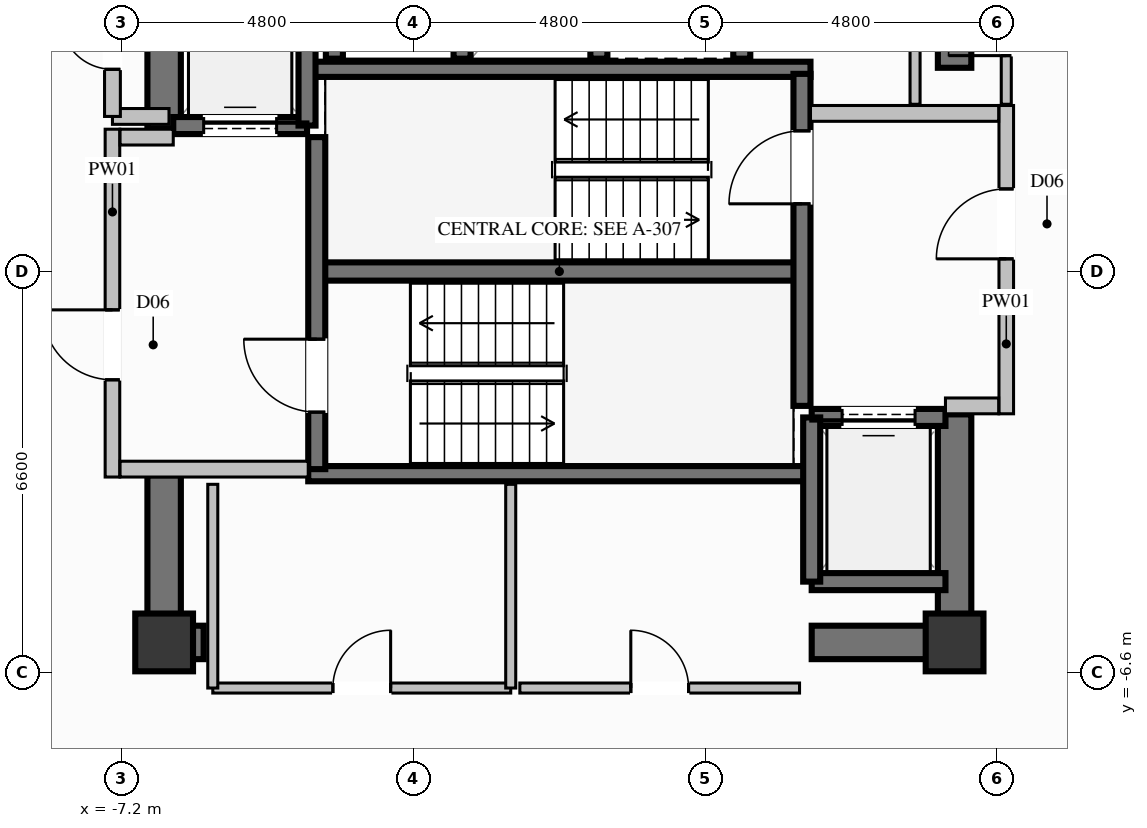
"""IFC4 building model, lengths in metres.
Left out: names, types, materials, properties, quantities, classifications, styles, units other than length and angle.
Written with IfcOpenShell. Run it as: python <this file> out.ifc"""

import sys

from ifc_helpers import new_model, si_unit, direction, frame, frame_2d, origin, origin_2d, place, context, subcontext, project, spatial, rectangle, extrude, element, fill, save


model = new_model("IFC4")
c1 = context("Model", 3, precision=1e-05, world=origin(), true_north=direction((0.0, 1.0)))
c2 = subcontext(c1, "Body", "Model", "MODEL_VIEW")
j1 = project(units=[si_unit("LENGTHUNIT", "METRE"), si_unit("PLANEANGLEUNIT", "RADIAN")], contexts=[c1])
p1 = place(None, origin())
s1 = spatial("IfcSite", under=j1, at=p1, CompositionType="ELEMENT")
p2 = place(p1, origin())
s2 = spatial("IfcBuilding", under=s1, at=p2, CompositionType="ELEMENT")
p3 = place(p2, frame((0.0, 0.0, 194.8)))
s3 = spatial("IfcBuildingStorey", under=s2, at=p3, CompositionType="ELEMENT", Elevation=194.8)
for number, where, z_axis, x_axis in (
    (1, (-6.5, -6.1, 0.0), (0.0, 0.0, 1.0), (1.0, 0.0, 0.0)),
    (2, (6.5, -6.1, 0.0), (0.0, 0.0, 1.0), (1.0, 0.0, 0.0)),
):
    element("IfcColumn", number, at=place(p3, frame(where, z_axis=z_axis, x_axis=x_axis)), inside=s3, PredefinedType="COLUMN", context=c2, shape_type="SweptSolid", body=[
        extrude(rectangle(XDim=0.95, YDim=0.95, at=origin_2d()), origin(), (0.0, 0.0, 1.0), 3.6),
    ])
p4 = place(p3, frame((-3.99, 0.0, 0.0), z_axis=(0.0, 0.0, 1.0), x_axis=(1.0, 0.0, 0.0)))
e3 = element("IfcWall", 3, at=p4, inside=s3, PredefinedType="SHEAR", context=c2, shape_type="SweptSolid", body=[
    extrude(rectangle(XDim=7.98, YDim=0.3, at=frame_2d((3.99, 0.0))), origin(), (0.0, 0.0, 1.0), 3.6),
])
for number, where, z_axis, x_axis in (
    (4, (-4.13, -3.325, 0.0), (0.0, 0.0, 1.0), (1.0, 0.0, 0.0)),
    (5, (-4.13, 3.325, 0.0), (0.0, 0.0, 1.0), (1.0, 0.0, 0.0)),
):
    element("IfcWall", number, at=place(p3, frame(where, z_axis=z_axis, x_axis=x_axis)), inside=s3, PredefinedType="SOLIDWALL", context=c2, shape_type="SweptSolid", body=[
        extrude(rectangle(XDim=8.26, YDim=0.25, at=frame_2d((4.13, 0.0))), origin(), (0.0, 0.0, 1.0), 3.6),
    ])
p5 = place(p3, frame((-6.225, -6.1, 0.0), z_axis=(0.0, 0.0, 1.0), x_axis=(1.0, 0.0, 0.0)))
e6 = element("IfcWall", 6, at=p5, inside=s3, PredefinedType="SHEAR", context=c2, shape_type="SweptSolid", body=[
    extrude(rectangle(XDim=0.375, YDim=0.55, at=frame_2d((0.188, 0.0))), origin(), (0.0, 0.0, 1.0), 3.6),
])
p6 = place(p3, frame((4.15, -6.1, 0.0), z_axis=(0.0, 0.0, 1.0), x_axis=(1.0, 0.0, 0.0)))
e7 = element("IfcWall", 7, at=p6, inside=s3, PredefinedType="SHEAR", context=c2, shape_type="SweptSolid", body=[
    extrude(rectangle(XDim=2.075, YDim=0.55, at=frame_2d((1.038, 0.0))), origin(), (0.0, 0.0, 1.0), 3.6),
])
p7 = place(p3, frame((-6.5, 2.35, 0.0), z_axis=(0.0, 0.0, 1.0), x_axis=(0.0, 1.0, 0.0)))
e8 = element("IfcWall", 8, at=p7, inside=s3, PredefinedType="SHEAR", context=c2, shape_type="SweptSolid", body=[
    extrude(rectangle(XDim=4.025, YDim=0.55, at=frame_2d((2.012, 0.0))), origin(), (0.0, 0.0, 1.0), 3.6),
])
p8 = place(p3, frame((-6.5, -6.375, 0.0), z_axis=(0.0, 0.0, 1.0), x_axis=(0.0, 1.0, 0.0)))
e9 = element("IfcWall", 9, at=p8, inside=s3, PredefinedType="SHEAR", context=c2, shape_type="SweptSolid", body=[
    extrude(rectangle(XDim=3.025, YDim=0.55, at=frame_2d((1.512, 0.0))), origin(), (0.0, 0.0, 1.0), 3.6),
])
p9 = place(p3, frame((6.5, -6.375, 0.0), z_axis=(0.0, 0.0, 1.0), x_axis=(0.0, 1.0, 0.0)))
e10 = element("IfcWall", 10, at=p9, inside=s3, PredefinedType="SHEAR", context=c2, shape_type="SweptSolid", body=[
    extrude(rectangle(XDim=4.025, YDim=0.55, at=frame_2d((2.012, 0.0))), origin(), (0.0, 0.0, 1.0), 3.6),
])
p10 = place(p3, frame((6.5, 3.35, 0.0), z_axis=(0.0, 0.0, 1.0), x_axis=(0.0, 1.0, 0.0)))
e11 = element("IfcWall", 11, at=p10, inside=s3, PredefinedType="SHEAR", context=c2, shape_type="SweptSolid", body=[
    extrude(rectangle(XDim=3.025, YDim=0.55, at=frame_2d((1.512, 0.0))), origin(), (0.0, 0.0, 1.0), 3.6),
])
for number, where, z_axis, x_axis in (
    (12, (-3.7, 6.0, 0.0), (0.0, 0.0, 1.0), (0.0, -1.0, 0.0)),
    (13, (-1.6, 3.5, 0.0), (0.0, 0.0, 1.0), (0.0, 1.0, 0.0)),
    (14, (0.65, 3.5, 0.0), (0.0, 0.0, 1.0), (0.0, 1.0, 0.0)),
    (15, (3.0, 3.5, 0.0), (0.0, 0.0, 1.0), (0.0, 1.0, 0.0)),
):
    element("IfcWall", number, at=place(p3, frame(where, z_axis=z_axis, x_axis=x_axis)), inside=s3, PredefinedType="SOLIDWALL", context=c2, shape_type="SweptSolid", body=[
        extrude(rectangle(XDim=2.5, YDim=0.28, at=frame_2d((1.25, 0.0))), origin(), (0.0, 0.0, 1.0), 3.36),
    ])
p11 = place(p3, frame((-6.35, 2.4, 0.0), z_axis=(0.0, 0.0, 1.0), x_axis=(1.0, 0.0, 0.0)))
e16 = element("IfcWall", 16, at=p11, inside=s3, PredefinedType="SOLIDWALL", context=c2, shape_type="SweptSolid", body=[
    extrude(rectangle(XDim=2.2, YDim=0.28, at=frame_2d((1.1, 0.0))), origin(), (0.0, 0.0, 1.0), 3.36),
])
p12 = place(p11, frame((0.5, 0.0, 0.0)))
e17 = element("IfcOpeningElement", 17, at=p12, cuts=e16, PredefinedType="OPENING", context=c2, shape_type="SweptSolid", body=[
    extrude(rectangle(XDim=1.2, YDim=2.2, at=frame_2d((0.6, 1.1))), frame((0.0, 0.15, 0.0), z_axis=(0.0, -1.0, 0.0), x_axis=(1.0, 0.0, 0.0)), (0.0, 0.0, 1.0), 0.3),
])
p13 = place(p3, frame((-4.15, 2.4, 0.0), z_axis=(0.0, 0.0, 1.0), x_axis=(0.0, 1.0, 0.0)))
e18 = element("IfcWall", 18, at=p13, inside=s3, PredefinedType="SOLIDWALL", context=c2, shape_type="SweptSolid", body=[
    extrude(rectangle(XDim=2.7, YDim=0.28, at=frame_2d((1.35, 0.0))), origin(), (0.0, 0.0, 1.0), 3.36),
])
p14 = place(p3, frame((4.15, -5.1, 0.0), z_axis=(0.0, 0.0, 1.0), x_axis=(1.0, 0.0, 0.0)))
e19 = element("IfcWall", 19, at=p14, inside=s3, PredefinedType="SOLIDWALL", context=c2, shape_type="SweptSolid", body=[
    extrude(rectangle(XDim=2.2, YDim=0.28, at=frame_2d((1.1, 0.0))), origin(), (0.0, 0.0, 1.0), 3.36),
])
p15 = place(p3, frame((6.35, -2.4, 0.0), z_axis=(0.0, 0.0, 1.0), x_axis=(-1.0, 0.0, 0.0)))
e20 = element("IfcWall", 20, at=p15, inside=s3, PredefinedType="SOLIDWALL", context=c2, shape_type="SweptSolid", body=[
    extrude(rectangle(XDim=2.2, YDim=0.28, at=frame_2d((1.1, 0.0))), origin(), (0.0, 0.0, 1.0), 3.36),
])
p16 = place(p15, frame((0.5, 0.0, 0.0)))
e21 = element("IfcOpeningElement", 21, at=p16, cuts=e20, PredefinedType="OPENING", context=c2, shape_type="SweptSolid", body=[
    extrude(rectangle(XDim=1.2, YDim=2.2, at=frame_2d((0.6, 1.1))), frame((0.0, 0.15, 0.0), z_axis=(0.0, -1.0, 0.0), x_axis=(1.0, 0.0, 0.0)), (0.0, 0.0, 1.0), 0.3),
])
p17 = place(p3, frame((4.15, -2.4, 0.0), z_axis=(0.0, 0.0, 1.0), x_axis=(0.0, -1.0, 0.0)))
e22 = element("IfcWall", 22, at=p17, inside=s3, PredefinedType="SOLIDWALL", context=c2, shape_type="SweptSolid", body=[
    extrude(rectangle(XDim=2.7, YDim=0.28, at=frame_2d((1.35, 0.0))), origin(), (0.0, 0.0, 1.0), 3.36),
])
p18 = place(p3, frame((-3.99, -3.25, 0.0), z_axis=(0.0, 0.0, 1.0), x_axis=(0.0, 1.0, 0.0)))
e23 = element("IfcWall", 23, at=p18, inside=s3, PredefinedType="SOLIDWALL", context=c2, shape_type="SweptSolid", body=[
    extrude(rectangle(XDim=5.46, YDim=0.28, at=frame_2d((2.73, 0.0))), origin(), (0.0, 0.0, 1.0), 3.36),
])
p19 = place(p18, frame((0.937, 0.0, 0.0)))
e24 = element("IfcOpeningElement", 24, at=p19, cuts=e23, PredefinedType="OPENING", context=c2, shape_type="SweptSolid", body=[
    extrude(rectangle(XDim=1.2, YDim=2.2, at=frame_2d((0.6, 1.1))), frame((0.0, 0.15, 0.0), z_axis=(0.0, -1.0, 0.0), x_axis=(1.0, 0.0, 0.0)), (0.0, 0.0, 1.0), 0.3),
])
p20 = place(p3, frame((3.99, -2.21, 0.0), z_axis=(0.0, 0.0, 1.0), x_axis=(0.0, 1.0, 0.0)))
e25 = element("IfcWall", 25, at=p20, inside=s3, PredefinedType="SOLIDWALL", context=c2, shape_type="SweptSolid", body=[
    extrude(rectangle(XDim=5.46, YDim=0.28, at=frame_2d((2.73, 0.0))), origin(), (0.0, 0.0, 1.0), 3.36),
])
p21 = place(p20, frame((3.323, 0.0, 0.0)))
e26 = element("IfcOpeningElement", 26, at=p21, cuts=e25, PredefinedType="OPENING", context=c2, shape_type="SweptSolid", body=[
    extrude(rectangle(XDim=1.2, YDim=2.2, at=frame_2d((0.6, 1.1))), frame((0.0, 0.15, 0.0), z_axis=(0.0, -1.0, 0.0), x_axis=(1.0, 0.0, 0.0)), (0.0, 0.0, 1.0), 0.3),
])
p22 = place(p3, frame((-7.35, -3.38, 0.0), z_axis=(0.0, 0.0, 1.0), x_axis=(0.0, 1.0, 0.0)))
e27 = element("IfcWall", 27, at=p22, inside=s3, PredefinedType="PARTITIONING", context=c2, shape_type="SweptSolid", body=[
    extrude(rectangle(XDim=5.72, YDim=0.24, at=frame_2d((2.86, 0.0))), origin(), (0.0, 0.0, 1.0), 2.445),
])
p23 = place(p22, frame((1.599, 0.0, 0.0)))
e28 = element("IfcOpeningElement", 28, at=p23, cuts=e27, PredefinedType="OPENING", context=c2, shape_type="SweptSolid", body=[
    extrude(rectangle(XDim=1.15, YDim=2.2, at=frame_2d((0.575, 1.1))), frame((0.0, 0.13, 0.0), z_axis=(0.0, -1.0, 0.0), x_axis=(1.0, 0.0, 0.0)), (0.0, 0.0, 1.0), 0.26),
])
p24 = place(p3, frame((-7.225, -3.25, 0.0), z_axis=(0.0, 0.0, 1.0), x_axis=(1.0, 0.0, 0.0)))
e29 = element("IfcWall", 29, at=p24, inside=s3, PredefinedType="PARTITIONING", context=c2, shape_type="SweptSolid", body=[
    extrude(rectangle(XDim=3.095, YDim=0.26, at=frame_2d((1.548, 0.0))), origin(), (0.0, 0.0, 1.0), 3.36),
])
p25 = place(p3, frame((-7.225, 2.21, 0.0), z_axis=(0.0, 0.0, 1.0), x_axis=(1.0, 0.0, 0.0)))
e30 = element("IfcWall", 30, at=p25, inside=s3, PredefinedType="PARTITIONING", context=c2, shape_type="SweptSolid", body=[
    extrude(rectangle(XDim=0.875, YDim=0.26, at=frame_2d((0.438, 0.0))), origin(), (0.0, 0.0, 1.0), 3.36),
])
p26 = place(p3, frame((7.35, -2.34, 0.0), z_axis=(0.0, 0.0, 1.0), x_axis=(0.0, 1.0, 0.0)))
e31 = element("IfcWall", 31, at=p26, inside=s3, PredefinedType="PARTITIONING", context=c2, shape_type="SweptSolid", body=[
    extrude(rectangle(XDim=5.07, YDim=0.24, at=frame_2d((2.535, 0.0))), origin(), (0.0, 0.0, 1.0), 2.445),
])
p27 = place(p26, frame((2.548, 0.0, 0.0)))
e32 = element("IfcOpeningElement", 32, at=p27, cuts=e31, PredefinedType="OPENING", context=c2, shape_type="SweptSolid", body=[
    extrude(rectangle(XDim=1.15, YDim=2.2, at=frame_2d((0.575, 1.1))), frame((0.0, 0.13, 0.0), z_axis=(0.0, -1.0, 0.0), x_axis=(1.0, 0.0, 0.0)), (0.0, 0.0, 1.0), 0.26),
])
p28 = place(p3, frame((6.35, -2.21, 0.0), z_axis=(0.0, 0.0, 1.0), x_axis=(1.0, 0.0, 0.0)))
e33 = element("IfcWall", 33, at=p28, inside=s3, PredefinedType="PARTITIONING", context=c2, shape_type="SweptSolid", body=[
    extrude(rectangle(XDim=0.875, YDim=0.26, at=frame_2d((0.438, 0.0))), origin(), (0.0, 0.0, 1.0), 3.36),
])
p29 = place(p3, frame((4.13, 2.6, 0.0), z_axis=(0.0, 0.0, 1.0), x_axis=(1.0, 0.0, 0.0)))
e34 = element("IfcWall", 34, at=p29, inside=s3, PredefinedType="PARTITIONING", context=c2, shape_type="SweptSolid", body=[
    extrude(rectangle(XDim=3.095, YDim=0.26, at=frame_2d((1.548, 0.0))), origin(), (0.0, 0.0, 1.0), 3.36),
])
p30 = place(p3, frame((-7.35, 2.55, 0.0), z_axis=(0.0, 0.0, 1.0), x_axis=(1.0, 0.0, 0.0)))
e35 = element("IfcWall", 35, at=p30, inside=s3, PredefinedType="PARTITIONING", context=c2, shape_type="SweptSolid", body=[
    extrude(rectangle(XDim=0.93, YDim=0.26, at=frame_2d((0.465, 0.0))), origin(), (0.0, 0.0, 1.0), 3.36),
])
p31 = place(p3, frame((-7.35, 2.55, 0.0), z_axis=(0.0, 0.0, 1.0), x_axis=(0.0, 1.0, 0.0)))
e36 = element("IfcWall", 36, at=p31, inside=s3, PredefinedType="PARTITIONING", context=c2, shape_type="SweptSolid", body=[
    extrude(rectangle(XDim=2.4, YDim=0.26, at=frame_2d((1.2, 0.0))), origin(), (0.0, 0.0, 1.0), 2.445),
])
p32 = place(p31, frame((0.775, 0.0, 0.0)))
e37 = element("IfcOpeningElement", 37, at=p32, cuts=e36, PredefinedType="OPENING", context=c2, shape_type="SweptSolid", body=[
    extrude(rectangle(XDim=0.85, YDim=2.05, at=frame_2d((0.425, 1.025))), frame((0.0, 0.14, 0.0), z_axis=(0.0, -1.0, 0.0), x_axis=(1.0, 0.0, 0.0)), (0.0, 0.0, 1.0), 0.28),
])
p33 = place(p3, frame((7.35, 2.75, 0.0), z_axis=(0.0, 0.0, 1.0), x_axis=(0.0, 1.0, 0.0)))
e38 = element("IfcWall", 38, at=p33, inside=s3, PredefinedType="PARTITIONING", context=c2, shape_type="SweptSolid", body=[
    extrude(rectangle(XDim=2.55, YDim=0.165, at=frame_2d((1.275, 0.0))), origin(), (0.0, 0.0, 1.0), 3.36),
])
p34 = place(p33, frame((0.8, 0.0, 0.0)))
e39 = element("IfcOpeningElement", 39, at=p34, cuts=e38, PredefinedType="OPENING", context=c2, shape_type="SweptSolid", body=[
    extrude(rectangle(XDim=0.95, YDim=2.1, at=frame_2d((0.475, 1.05))), frame((0.0, 0.093, 0.0), z_axis=(0.0, -1.0, 0.0), x_axis=(1.0, 0.0, 0.0)), (0.0, 0.0, 1.0), 0.185),
])
p35 = place(p3, frame((5.85, 5.3, 0.0), z_axis=(0.0, 0.0, 1.0), x_axis=(0.0, -1.0, 0.0)))
e40 = element("IfcWall", 40, at=p35, inside=s3, PredefinedType="PARTITIONING", context=c2, shape_type="SweptSolid", body=[
    extrude(rectangle(XDim=2.55, YDim=0.165, at=frame_2d((1.275, 0.0))), origin(), (0.0, 0.0, 1.0), 2.445),
])
p36 = place(p3, frame((-5.7, -6.85, 0.0), z_axis=(0.0, 0.0, 1.0), x_axis=(1.0, 0.0, 0.0)))
e41 = element("IfcWall", 41, at=p36, inside=s3, PredefinedType="PARTITIONING", context=c2, shape_type="SweptSolid", body=[
    extrude(rectangle(XDim=4.9, YDim=0.165, at=frame_2d((2.45, 0.0))), origin(), (0.0, 0.0, 1.0), 2.445),
])
p37 = place(p36, frame((1.975, 0.0, 0.0)))
e42 = element("IfcOpeningElement", 42, at=p37, cuts=e41, PredefinedType="OPENING", context=c2, shape_type="SweptSolid", body=[
    extrude(rectangle(XDim=0.95, YDim=2.1, at=frame_2d((0.475, 1.05))), frame((0.0, 0.093, 0.0), z_axis=(0.0, -1.0, 0.0), x_axis=(1.0, 0.0, 0.0)), (0.0, 0.0, 1.0), 0.185),
])
p38 = place(p3, frame((-0.8, -6.85, 0.0), z_axis=(0.0, 0.0, 1.0), x_axis=(0.0, 1.0, 0.0)))
e43 = element("IfcWall", 43, at=p38, inside=s3, PredefinedType="PARTITIONING", context=c2, shape_type="SweptSolid", body=[
    extrude(rectangle(XDim=3.35, YDim=0.165, at=frame_2d((1.675, 0.0))), origin(), (0.0, 0.0, 1.0), 3.36),
])
p39 = place(p3, frame((-5.7, -3.5, 0.0), z_axis=(0.0, 0.0, 1.0), x_axis=(0.0, -1.0, 0.0)))
e44 = element("IfcWall", 44, at=p39, inside=s3, PredefinedType="PARTITIONING", context=c2, shape_type="SweptSolid", body=[
    extrude(rectangle(XDim=3.35, YDim=0.165, at=frame_2d((1.675, 0.0))), origin(), (0.0, 0.0, 1.0), 2.445),
])
p40 = place(p3, frame((-0.65, -6.85, 0.0), z_axis=(0.0, 0.0, 1.0), x_axis=(1.0, 0.0, 0.0)))
e45 = element("IfcWall", 45, at=p40, inside=s3, PredefinedType="PARTITIONING", context=c2, shape_type="SweptSolid", body=[
    extrude(rectangle(XDim=4.6, YDim=0.165, at=frame_2d((2.3, 0.0))), origin(), (0.0, 0.0, 1.0), 2.445),
])
p41 = place(p40, frame((1.825, 0.0, 0.0)))
e46 = element("IfcOpeningElement", 46, at=p41, cuts=e45, PredefinedType="OPENING", context=c2, shape_type="SweptSolid", body=[
    extrude(rectangle(XDim=0.95, YDim=2.1, at=frame_2d((0.475, 1.05))), frame((0.0, 0.093, 0.0), z_axis=(0.0, -1.0, 0.0), x_axis=(1.0, 0.0, 0.0)), (0.0, 0.0, 1.0), 0.185),
])
p42 = place(p12, origin())
e47 = element("IfcDoor", 47, at=p42, inside=s3, OperationType="SLIDING_TO_LEFT", PredefinedType="DOOR", context=c2, shape_type="SweptSolid", body=[
    extrude(rectangle(XDim=1.2, YDim=2.2, at=frame_2d((0.6, 1.1))), frame((0.0, 0.025, 0.0), z_axis=(0.0, -1.0, 0.0), x_axis=(1.0, 0.0, 0.0)), (0.0, 0.0, 1.0), 0.05),
])
fill(e17, e47)
p43 = place(p16, origin())
e48 = element("IfcDoor", 48, at=p43, inside=s3, OperationType="SLIDING_TO_LEFT", PredefinedType="DOOR", context=c2, shape_type="SweptSolid", body=[
    extrude(rectangle(XDim=1.2, YDim=2.2, at=frame_2d((0.6, 1.1))), frame((0.0, 0.025, 0.0), z_axis=(0.0, -1.0, 0.0), x_axis=(1.0, 0.0, 0.0)), (0.0, 0.0, 1.0), 0.05),
])
fill(e21, e48)
p44 = place(p19, origin())
e49 = element("IfcDoor", 49, at=p44, inside=s3, OperationType="SINGLE_SWING_RIGHT", PredefinedType="DOOR", context=c2, shape_type="SweptSolid", body=[
    extrude(rectangle(XDim=1.2, YDim=2.2, at=frame_2d((0.6, 1.1))), frame((0.0, 0.025, 0.0), z_axis=(0.0, -1.0, 0.0), x_axis=(1.0, 0.0, 0.0)), (0.0, 0.0, 1.0), 0.05),
])
fill(e24, e49)
p45 = place(p21, origin())
e50 = element("IfcDoor", 50, at=p45, inside=s3, OperationType="SINGLE_SWING_LEFT", PredefinedType="DOOR", context=c2, shape_type="SweptSolid", body=[
    extrude(rectangle(XDim=1.2, YDim=2.2, at=frame_2d((0.6, 1.1))), frame((0.0, 0.025, 0.0), z_axis=(0.0, -1.0, 0.0), x_axis=(1.0, 0.0, 0.0)), (0.0, 0.0, 1.0), 0.05),
])
fill(e26, e50)
p46 = place(p23, origin())
e51 = element("IfcDoor", 51, at=p46, inside=s3, OperationType="SINGLE_SWING_RIGHT", PredefinedType="DOOR", context=c2, shape_type="SweptSolid", body=[
    extrude(rectangle(XDim=1.15, YDim=2.2, at=frame_2d((0.575, 1.1))), frame((0.0, 0.025, 0.0), z_axis=(0.0, -1.0, 0.0), x_axis=(1.0, 0.0, 0.0)), (0.0, 0.0, 1.0), 0.05),
])
fill(e28, e51)
p47 = place(p27, origin())
e52 = element("IfcDoor", 52, at=p47, inside=s3, OperationType="SINGLE_SWING_LEFT", PredefinedType="DOOR", context=c2, shape_type="SweptSolid", body=[
    extrude(rectangle(XDim=1.15, YDim=2.2, at=frame_2d((0.575, 1.1))), frame((0.0, 0.025, 0.0), z_axis=(0.0, -1.0, 0.0), x_axis=(1.0, 0.0, 0.0)), (0.0, 0.0, 1.0), 0.05),
])
fill(e32, e52)
p48 = place(p32, origin())
e53 = element("IfcDoor", 53, at=p48, inside=s3, OperationType="SINGLE_SWING_RIGHT", PredefinedType="DOOR", context=c2, shape_type="SweptSolid", body=[
    extrude(rectangle(XDim=0.85, YDim=2.05, at=frame_2d((0.425, 1.025))), frame((0.0, 0.025, 0.0), z_axis=(0.0, -1.0, 0.0), x_axis=(1.0, 0.0, 0.0)), (0.0, 0.0, 1.0), 0.05),
])
fill(e37, e53)
p49 = place(p34, origin())
e54 = element("IfcDoor", 54, at=p49, inside=s3, OperationType="SINGLE_SWING_LEFT", PredefinedType="DOOR", context=c2, shape_type="SweptSolid", body=[
    extrude(rectangle(XDim=0.95, YDim=2.1, at=frame_2d((0.475, 1.05))), frame((0.0, 0.025, 0.0), z_axis=(0.0, -1.0, 0.0), x_axis=(1.0, 0.0, 0.0)), (0.0, 0.0, 1.0), 0.05),
])
fill(e39, e54)
p50 = place(p37, origin())
e55 = element("IfcDoor", 55, at=p50, inside=s3, OperationType="SINGLE_SWING_RIGHT", PredefinedType="DOOR", context=c2, shape_type="SweptSolid", body=[
    extrude(rectangle(XDim=0.95, YDim=2.1, at=frame_2d((0.475, 1.05))), frame((0.0, 0.025, 0.0), z_axis=(0.0, -1.0, 0.0), x_axis=(1.0, 0.0, 0.0)), (0.0, 0.0, 1.0), 0.05),
])
fill(e42, e55)
p51 = place(p41, origin())
e56 = element("IfcDoor", 56, at=p51, inside=s3, OperationType="SINGLE_SWING_LEFT", PredefinedType="DOOR", context=c2, shape_type="SweptSolid", body=[
    extrude(rectangle(XDim=0.95, YDim=2.1, at=frame_2d((0.475, 1.05))), frame((0.0, 0.025, 0.0), z_axis=(0.0, -1.0, 0.0), x_axis=(1.0, 0.0, 0.0)), (0.0, 0.0, 1.0), 0.05),
])
fill(e46, e56)
save(model, sys.argv[1])
